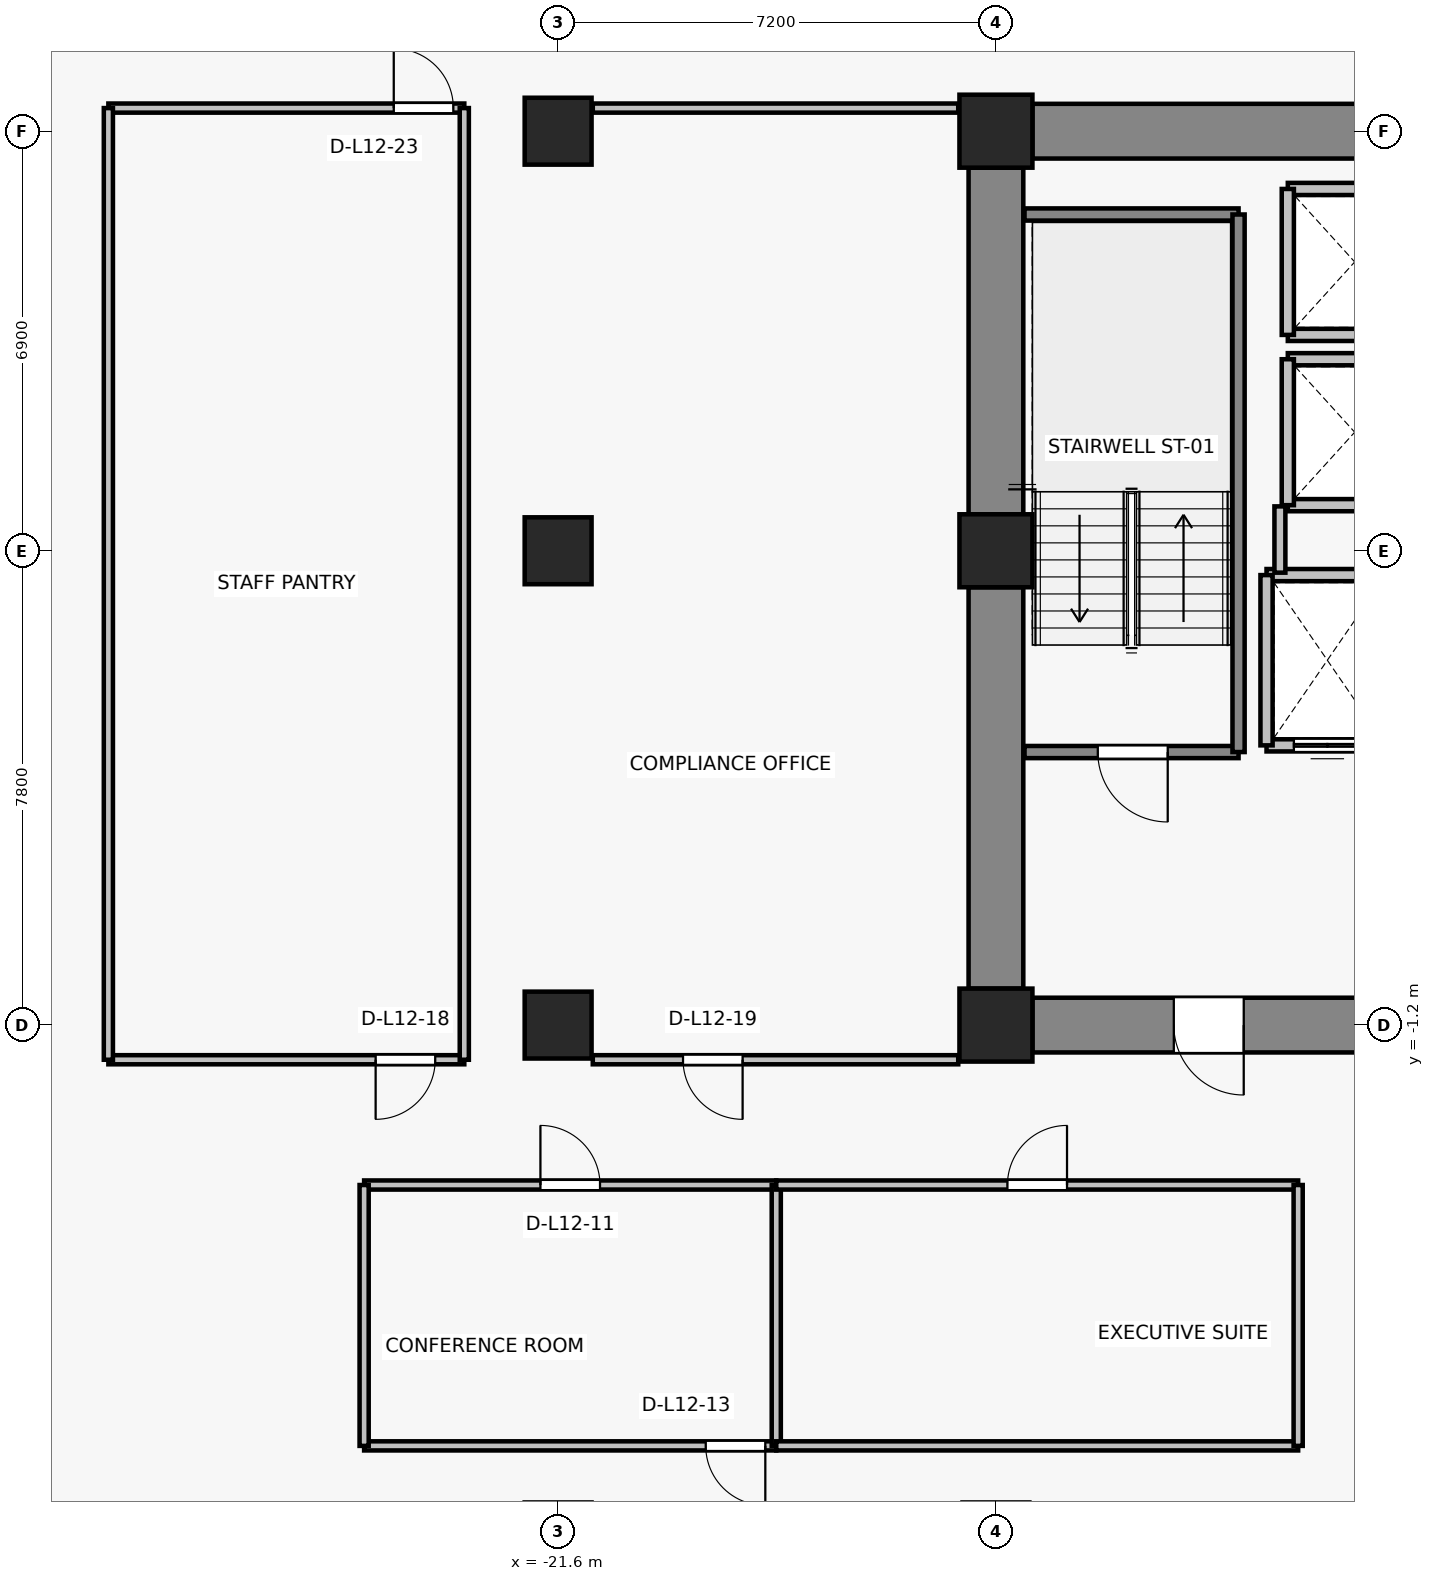
"""IFC4 building model, lengths in metres.
Left out: names, types, materials, properties, quantities, classifications, styles, units other than length and angle.
Written with IfcOpenShell. Run it as: python <this file> out.ifc"""

import sys

from ifc_helpers import new_model, si_unit, direction, frame, frame_2d, origin, origin_2d, place, context, subcontext, project, spatial, rectangle, extrude, source, transform, mapped, element, fill, save


model = new_model("IFC4")
c1 = context("Model", 3, precision=1e-05, world=origin(), true_north=direction((0.0, 1.0)))
c2 = subcontext(c1, "Body", "Model", "MODEL_VIEW")
j1 = project(units=[si_unit("LENGTHUNIT", "METRE"), si_unit("PLANEANGLEUNIT", "RADIAN")], contexts=[c1])
p1 = place(None, origin())
s1 = spatial("IfcSite", under=j1, at=p1, CompositionType="ELEMENT")
p2 = place(p1, origin())
s2 = spatial("IfcBuilding", under=s1, at=p2, CompositionType="ELEMENT")
p3 = place(p2, frame((0.0, 0.0, 47.2)))
s3 = spatial("IfcBuildingStorey", under=s2, at=p3, CompositionType="ELEMENT", Elevation=47.2)
for number, where, z_axis, x_axis in (
    (1, (-14.4, -1.2, 0.0), (0.0, 0.0, 1.0), (1.0, 0.0, 0.0)),
    (2, (-14.4, 6.6, 0.0), (0.0, 0.0, 1.0), (1.0, 0.0, 0.0)),
    (3, (-14.4, 13.5, 0.0), (0.0, 0.0, 1.0), (1.0, 0.0, 0.0)),
):
    element("IfcColumn", number, at=place(p3, frame(where, z_axis=z_axis, x_axis=x_axis)), inside=s3, PredefinedType="COLUMN", context=c2, shape_type="SweptSolid", body=[
        extrude(rectangle(XDim=1.2, YDim=1.2, at=origin_2d()), origin(), (0.0, 0.0, 1.0), 3.3),
    ])
for number, where, z_axis, x_axis in (
    (4, (-21.6, -1.2, 0.0), (0.0, 0.0, 1.0), (1.0, 0.0, 0.0)),
    (5, (-21.6, 6.6, 0.0), (0.0, 0.0, 1.0), (1.0, 0.0, 0.0)),
    (6, (-21.6, 13.5, 0.0), (0.0, 0.0, 1.0), (1.0, 0.0, 0.0)),
):
    element("IfcColumn", number, at=place(p3, frame(where, z_axis=z_axis, x_axis=x_axis)), inside=s3, PredefinedType="COLUMN", context=c2, shape_type="SweptSolid", body=[
        extrude(rectangle(XDim=1.1, YDim=1.1, at=origin_2d()), origin(), (0.0, 0.0, 1.0), 3.3),
    ])
p4 = place(p3, frame((-13.8, 13.5, 0.0), z_axis=(0.0, 0.0, 1.0), x_axis=(1.0, 0.0, 0.0)))
e7 = element("IfcWall", 7, at=p4, inside=s3, PredefinedType="SHEAR", context=c2, shape_type="SweptSolid", body=[
    extrude(rectangle(XDim=6.0, YDim=0.9, at=frame_2d((3.0, 0.0))), origin(), (0.0, 0.0, 1.0), 3.075),
])
p5 = place(p3, frame((-14.4, -0.6, 0.0), z_axis=(0.0, 0.0, 1.0), x_axis=(0.0, 1.0, 0.0)))
e8 = element("IfcWall", 8, at=p5, inside=s3, PredefinedType="SHEAR", context=c2, shape_type="SweptSolid", body=[
    extrude(rectangle(XDim=6.6, YDim=0.9, at=frame_2d((3.3, 0.0))), origin(), (0.0, 0.0, 1.0), 3.075),
])
p6 = place(p3, frame((-14.4, 7.2, 0.0), z_axis=(0.0, 0.0, 1.0), x_axis=(0.0, 1.0, 0.0)))
e9 = element("IfcWall", 9, at=p6, inside=s3, PredefinedType="SHEAR", context=c2, shape_type="SweptSolid", body=[
    extrude(rectangle(XDim=5.7, YDim=0.9, at=frame_2d((2.85, 0.0))), origin(), (0.0, 0.0, 1.0), 3.075),
])
p7 = place(p3, frame((-7.8, -1.2, 0.0), z_axis=(0.0, 0.0, 1.0), x_axis=(-1.0, 0.0, 0.0)))
e10 = element("IfcWall", 10, at=p7, inside=s3, PredefinedType="SHEAR", context=c2, shape_type="SweptSolid", body=[
    extrude(rectangle(XDim=6.0, YDim=0.9, at=frame_2d((3.0, 0.0))), origin(), (0.0, 0.0, 1.0), 3.075),
])
p8 = place(p7, frame((2.525, 0.0, 0.0)))
e11 = element("IfcOpeningElement", 11, at=p8, cuts=e10, PredefinedType="OPENING", context=c2, shape_type="SweptSolid", body=[
    extrude(rectangle(XDim=1.15, YDim=2.15, at=frame_2d((0.575, 1.075))), frame((0.0, 0.46, 0.0), z_axis=(0.0, -1.0, 0.0), x_axis=(1.0, 0.0, 0.0)), (0.0, 0.0, 1.0), 0.92),
])
p9 = place(p3, frame((-7.95, 3.4, 0.0), z_axis=(0.0, 0.0, 1.0), x_axis=(-1.0, 0.0, 0.0)))
e12 = element("IfcWall", 12, at=p9, inside=s3, PredefinedType="SOLIDWALL", context=c2, shape_type="SweptSolid", body=[
    extrude(rectangle(XDim=2.0, YDim=0.2, at=frame_2d((1.0, 0.0))), origin(), (0.0, 0.0, 1.0), 3.075),
])
p10 = place(p9, frame((0.45, 0.0, 0.0)))
e13 = element("IfcOpeningElement", 13, at=p10, cuts=e12, PredefinedType="OPENING", context=c2, shape_type="SweptSolid", body=[
    extrude(rectangle(XDim=1.1, YDim=2.2, at=frame_2d((0.55, 1.1))), frame((0.0, 0.11, 0.0), z_axis=(0.0, -1.0, 0.0), x_axis=(1.0, 0.0, 0.0)), (0.0, 0.0, 1.0), 0.22),
])
p11 = place(p3, frame((-9.95, 6.2, 0.0), z_axis=(0.0, 0.0, 1.0), x_axis=(1.0, 0.0, 0.0)))
e14 = element("IfcWall", 14, at=p11, inside=s3, PredefinedType="SOLIDWALL", context=c2, shape_type="SweptSolid", body=[
    extrude(rectangle(XDim=2.0, YDim=0.2, at=frame_2d((1.0, 0.0))), origin(), (0.0, 0.0, 1.0), 3.075),
])
p12 = place(p3, frame((-9.95, 3.4, 0.0), z_axis=(0.0, 0.0, 1.0), x_axis=(0.0, 1.0, 0.0)))
e15 = element("IfcWall", 15, at=p12, inside=s3, PredefinedType="SOLIDWALL", context=c2, shape_type="SweptSolid", body=[
    extrude(rectangle(XDim=2.8, YDim=0.2, at=frame_2d((1.4, 0.0))), origin(), (0.0, 0.0, 1.0), 3.075),
])
for number, where, z_axis, x_axis in (
    (16, (-7.4, 7.35, 0.0), (0.0, 0.0, 1.0), (-1.0, 0.0, 0.0)),
    (17, (-9.6, 9.75, 0.0), (0.0, 0.0, 1.0), (1.0, 0.0, 0.0)),
):
    element("IfcWall", number, at=place(p3, frame(where, z_axis=z_axis, x_axis=x_axis)), inside=s3, PredefinedType="SOLIDWALL", context=c2, shape_type="SweptSolid", body=[
        extrude(rectangle(XDim=2.2, YDim=0.2, at=frame_2d((1.1, 0.0))), origin(), (0.0, 0.0, 1.0), 2.465),
    ])
p13 = place(p3, frame((-9.6, 7.35, 0.0), z_axis=(0.0, 0.0, 1.0), x_axis=(0.0, 1.0, 0.0)))
e18 = element("IfcWall", 18, at=p13, inside=s3, PredefinedType="SOLIDWALL", context=c2, shape_type="SweptSolid", body=[
    extrude(rectangle(XDim=2.4, YDim=0.2, at=frame_2d((1.2, 0.0))), origin(), (0.0, 0.0, 1.0), 3.075),
])
for number, where, z_axis, x_axis in (
    (19, (-7.4, 10.15, 0.0), (0.0, 0.0, 1.0), (-1.0, 0.0, 0.0)),
    (20, (-9.6, 12.55, 0.0), (0.0, 0.0, 1.0), (1.0, 0.0, 0.0)),
):
    element("IfcWall", number, at=place(p3, frame(where, z_axis=z_axis, x_axis=x_axis)), inside=s3, PredefinedType="SOLIDWALL", context=c2, shape_type="SweptSolid", body=[
        extrude(rectangle(XDim=2.2, YDim=0.2, at=frame_2d((1.1, 0.0))), origin(), (0.0, 0.0, 1.0), 2.465),
    ])
p14 = place(p3, frame((-9.6, 10.15, 0.0), z_axis=(0.0, 0.0, 1.0), x_axis=(0.0, 1.0, 0.0)))
e21 = element("IfcWall", 21, at=p14, inside=s3, PredefinedType="SOLIDWALL", context=c2, shape_type="SweptSolid", body=[
    extrude(rectangle(XDim=2.4, YDim=0.2, at=frame_2d((1.2, 0.0))), origin(), (0.0, 0.0, 1.0), 3.075),
])
p15 = place(p3, frame((-10.41, 3.29, 0.0), z_axis=(0.0, 0.0, 1.0), x_axis=(-1.0, 0.0, 0.0)))
e22 = element("IfcWall", 22, at=p15, inside=s3, PredefinedType="SOLIDWALL", context=c2, shape_type="SweptSolid", body=[
    extrude(rectangle(XDim=3.52, YDim=0.2, at=frame_2d((1.76, 0.0))), origin(), (0.0, 0.0, 1.0), 3.075),
])
p16 = place(p15, frame((1.165, 0.0, 0.0)))
e23 = element("IfcOpeningElement", 23, at=p16, cuts=e22, PredefinedType="OPENING", context=c2, shape_type="SweptSolid", body=[
    extrude(rectangle(XDim=1.15, YDim=2.15, at=frame_2d((0.575, 1.075))), frame((0.0, 0.11, 0.0), z_axis=(0.0, -1.0, 0.0), x_axis=(1.0, 0.0, 0.0)), (0.0, 0.0, 1.0), 0.22),
])
p17 = place(p3, frame((-13.93, 12.13, 0.0), z_axis=(0.0, 0.0, 1.0), x_axis=(1.0, 0.0, 0.0)))
e24 = element("IfcWall", 24, at=p17, inside=s3, PredefinedType="SOLIDWALL", context=c2, shape_type="SweptSolid", body=[
    extrude(rectangle(XDim=3.52, YDim=0.2, at=frame_2d((1.76, 0.0))), origin(), (0.0, 0.0, 1.0), 3.075),
])
p18 = place(p3, frame((-10.41, 12.13, 0.0), z_axis=(0.0, 0.0, 1.0), x_axis=(0.0, -1.0, 0.0)))
e25 = element("IfcWall", 25, at=p18, inside=s3, PredefinedType="SOLIDWALL", context=c2, shape_type="SweptSolid", body=[
    extrude(rectangle(XDim=8.84, YDim=0.2, at=frame_2d((4.42, 0.0))), origin(), (0.0, 0.0, 1.0), 3.075),
])
p19 = place(p3, frame((-9.73, 6.24, 0.0), z_axis=(0.0, 0.0, 1.0), x_axis=(0.0, 1.0, 0.0)))
e26 = element("IfcWall", 26, at=p19, inside=s3, PredefinedType="PARTITIONING", context=c2, shape_type="SweptSolid", body=[
    extrude(rectangle(XDim=1.09, YDim=0.18, at=frame_2d((0.545, 0.0))), origin(), (0.0, 0.0, 1.0), 3.075),
])
p20 = place(p3, frame((-18.012, -8.12, 0.0), z_axis=(0.0, 0.0, 1.0), x_axis=(-1.0, 0.0, 0.0)))
e27 = element("IfcWall", 27, at=p20, inside=s3, PredefinedType="PARTITIONING", context=c2, shape_type="SweptSolid", body=[
    extrude(rectangle(XDim=6.778, YDim=0.15, at=frame_2d((3.389, 0.0))), origin(), (0.0, 0.0, 1.0), 2.465),
])
p21 = place(p20, frame((0.18, 0.0, 0.0)))
e28 = element("IfcOpeningElement", 28, at=p21, cuts=e27, PredefinedType="OPENING", context=c2, shape_type="SweptSolid", body=[
    extrude(rectangle(XDim=0.98, YDim=2.15, at=frame_2d((0.49, 1.075))), frame((0.0, 0.085, 0.0), z_axis=(0.0, -1.0, 0.0), x_axis=(1.0, 0.0, 0.0)), (0.0, 0.0, 1.0), 0.17),
])
p22 = place(p3, frame((-24.79, -3.83, 0.0), z_axis=(0.0, 0.0, 1.0), x_axis=(1.0, 0.0, 0.0)))
e29 = element("IfcWall", 29, at=p22, inside=s3, PredefinedType="PARTITIONING", context=c2, shape_type="SweptSolid", body=[
    extrude(rectangle(XDim=6.778, YDim=0.15, at=frame_2d((3.389, 0.0))), origin(), (0.0, 0.0, 1.0), 2.465),
])
p23 = place(p22, frame((2.899, 0.0, 0.0)))
e30 = element("IfcOpeningElement", 30, at=p23, cuts=e29, PredefinedType="OPENING", context=c2, shape_type="SweptSolid", body=[
    extrude(rectangle(XDim=0.98, YDim=2.15, at=frame_2d((0.49, 1.075))), frame((0.0, 0.085, 0.0), z_axis=(0.0, -1.0, 0.0), x_axis=(1.0, 0.0, 0.0)), (0.0, 0.0, 1.0), 0.17),
])
for number, where, z_axis, x_axis in (
    (31, (-24.79, -8.12, 0.0), (0.0, 0.0, 1.0), (0.0, 1.0, 0.0)),
    (32, (-18.012, -3.83, 0.0), (0.0, 0.0, 1.0), (0.0, -1.0, 0.0)),
):
    element("IfcWall", number, at=place(p3, frame(where, z_axis=z_axis, x_axis=x_axis)), inside=s3, PredefinedType="PARTITIONING", context=c2, shape_type="SweptSolid", body=[
        extrude(rectangle(XDim=4.29, YDim=0.15, at=frame_2d((2.145, 0.0))), origin(), (0.0, 0.0, 1.0), 2.565),
    ])
p24 = place(p3, frame((-9.43, -8.12, 0.0), z_axis=(0.0, 0.0, 1.0), x_axis=(-1.0, 0.0, 0.0)))
e33 = element("IfcWall", 33, at=p24, inside=s3, PredefinedType="PARTITIONING", context=c2, shape_type="SweptSolid", body=[
    extrude(rectangle(XDim=8.583, YDim=0.15, at=frame_2d((4.291, 0.0))), origin(), (0.0, 0.0, 1.0), 2.465),
])
p25 = place(p3, frame((-18.012, -3.83, 0.0), z_axis=(0.0, 0.0, 1.0), x_axis=(1.0, 0.0, 0.0)))
e34 = element("IfcWall", 34, at=p25, inside=s3, PredefinedType="PARTITIONING", context=c2, shape_type="SweptSolid", body=[
    extrude(rectangle(XDim=8.583, YDim=0.15, at=frame_2d((4.291, 0.0))), origin(), (0.0, 0.0, 1.0), 2.465),
])
p26 = place(p25, frame((3.802, 0.0, 0.0)))
e35 = element("IfcOpeningElement", 35, at=p26, cuts=e34, PredefinedType="OPENING", context=c2, shape_type="SweptSolid", body=[
    extrude(rectangle(XDim=0.98, YDim=2.15, at=frame_2d((0.49, 1.075))), frame((0.0, 0.085, 0.0), z_axis=(0.0, -1.0, 0.0), x_axis=(1.0, 0.0, 0.0)), (0.0, 0.0, 1.0), 0.17),
])
p27 = place(p3, frame((-9.43, -3.83, 0.0), z_axis=(0.0, 0.0, 1.0), x_axis=(0.0, -1.0, 0.0)))
e36 = element("IfcWall", 36, at=p27, inside=s3, PredefinedType="PARTITIONING", context=c2, shape_type="SweptSolid", body=[
    extrude(rectangle(XDim=4.29, YDim=0.15, at=frame_2d((2.145, 0.0))), origin(), (0.0, 0.0, 1.0), 2.565),
])
p28 = place(p3, frame((-23.143, -1.77, 0.0), z_axis=(0.0, 0.0, 1.0), x_axis=(-1.0, 0.0, 0.0)))
e37 = element("IfcWall", 37, at=p28, inside=s3, PredefinedType="PARTITIONING", context=c2, shape_type="SweptSolid", body=[
    extrude(rectangle(XDim=5.853, YDim=0.15, at=frame_2d((2.927, 0.0))), origin(), (0.0, 0.0, 1.0), 3.075),
])
p29 = place(p28, frame((0.478, 0.0, 0.0)))
e38 = element("IfcOpeningElement", 38, at=p29, cuts=e37, PredefinedType="OPENING", context=c2, shape_type="SweptSolid", body=[
    extrude(rectangle(XDim=0.98, YDim=2.15, at=frame_2d((0.49, 1.075))), frame((0.0, 0.085, 0.0), z_axis=(0.0, -1.0, 0.0), x_axis=(1.0, 0.0, 0.0)), (0.0, 0.0, 1.0), 0.17),
])
p30 = place(p3, frame((-28.996, 13.88, 0.0), z_axis=(0.0, 0.0, 1.0), x_axis=(1.0, 0.0, 0.0)))
e39 = element("IfcWall", 39, at=p30, inside=s3, PredefinedType="PARTITIONING", context=c2, shape_type="SweptSolid", body=[
    extrude(rectangle(XDim=5.853, YDim=0.15, at=frame_2d((2.927, 0.0))), origin(), (0.0, 0.0, 1.0), 3.075),
])
p31 = place(p30, frame((4.693, 0.0, 0.0)))
e40 = element("IfcOpeningElement", 40, at=p31, cuts=e39, PredefinedType="OPENING", context=c2, shape_type="SweptSolid", body=[
    extrude(rectangle(XDim=0.98, YDim=2.15, at=frame_2d((0.49, 1.075))), frame((0.0, 0.085, 0.0), z_axis=(0.0, -1.0, 0.0), x_axis=(1.0, 0.0, 0.0)), (0.0, 0.0, 1.0), 0.17),
])
for number, where, z_axis, x_axis in (
    (41, (-28.996, -1.77, 0.0), (0.0, 0.0, 1.0), (0.0, 1.0, 0.0)),
    (42, (-23.143, 13.88, 0.0), (0.0, 0.0, 1.0), (0.0, -1.0, 0.0)),
):
    element("IfcWall", number, at=place(p3, frame(where, z_axis=z_axis, x_axis=x_axis)), inside=s3, PredefinedType="PARTITIONING", context=c2, shape_type="SweptSolid", body=[
        extrude(rectangle(XDim=15.65, YDim=0.15, at=frame_2d((7.825, 0.0))), origin(), (0.0, 0.0, 1.0), 2.465),
    ])
p32 = place(p3, frame((-15.02, -1.77, 0.0), z_axis=(0.0, 0.0, 1.0), x_axis=(-1.0, 0.0, 0.0)))
e43 = element("IfcWall", 43, at=p32, inside=s3, PredefinedType="PARTITIONING", context=c2, shape_type="SweptSolid", body=[
    extrude(rectangle(XDim=6.01, YDim=0.15, at=frame_2d((3.005, 0.0))), origin(), (0.0, 0.0, 1.0), 3.075),
])
p33 = place(p32, frame((3.546, 0.0, 0.0)))
e44 = element("IfcOpeningElement", 44, at=p33, cuts=e43, PredefinedType="OPENING", context=c2, shape_type="SweptSolid", body=[
    extrude(rectangle(XDim=0.98, YDim=2.15, at=frame_2d((0.49, 1.075))), frame((0.0, 0.085, 0.0), z_axis=(0.0, -1.0, 0.0), x_axis=(1.0, 0.0, 0.0)), (0.0, 0.0, 1.0), 0.17),
])
p34 = place(p3, frame((-21.03, 13.88, 0.0), z_axis=(0.0, 0.0, 1.0), x_axis=(1.0, 0.0, 0.0)))
e45 = element("IfcWall", 45, at=p34, inside=s3, PredefinedType="PARTITIONING", context=c2, shape_type="SweptSolid", body=[
    extrude(rectangle(XDim=6.01, YDim=0.15, at=frame_2d((3.005, 0.0))), origin(), (0.0, 0.0, 1.0), 3.075),
])
m1 = source(origin(), c2, "Body", "SweptSolid", [
    extrude(rectangle(XDim=1.1, YDim=2.2, at=frame_2d((0.55, 1.1))), frame((0.0, 0.025, 0.0), z_axis=(0.0, -1.0, 0.0), x_axis=(1.0, 0.0, 0.0)), (0.0, 0.0, 1.0), 0.05),
])
p35 = place(p10, origin())
e46 = element("IfcDoor", 46, at=p35, inside=s3, OperationType="DOUBLE_DOOR_SLIDING", PredefinedType="DOOR", context=c2, shape_type="MappedRepresentation", body=[
    mapped(m1, transform((0.0, 0.0, 0.0), x_axis=(1.0, 0.0, 0.0), y_axis=(0.0, 1.0, 0.0), z_axis=(0.0, 0.0, 1.0), scale=1.0)),
])
fill(e13, e46)
m2 = source(origin(), c2, "Body", "SweptSolid", [
    extrude(rectangle(XDim=1.15, YDim=2.15, at=frame_2d((0.575, 1.075))), frame((0.0, 0.025, 0.0), z_axis=(0.0, -1.0, 0.0), x_axis=(1.0, 0.0, 0.0)), (0.0, 0.0, 1.0), 0.05),
])
p36 = place(p16, origin())
e47 = element("IfcDoor", 47, at=p36, inside=s3, OperationType="SINGLE_SWING_LEFT", PredefinedType="DOOR", context=c2, shape_type="MappedRepresentation", body=[
    mapped(m2, transform((0.0, 0.0, 0.0), x_axis=(1.0, 0.0, 0.0), y_axis=(0.0, 1.0, 0.0), z_axis=(0.0, 0.0, 1.0), scale=1.0)),
])
fill(e23, e47)
p37 = place(p8, origin())
e48 = element("IfcDoor", 48, at=p37, inside=s3, OperationType="SINGLE_SWING_LEFT", PredefinedType="DOOR", context=c2, shape_type="MappedRepresentation", body=[
    mapped(m2, transform((0.0, 0.0, 0.0), x_axis=(1.0, 0.0, 0.0), y_axis=(0.0, 1.0, 0.0), z_axis=(0.0, 0.0, 1.0), scale=1.0)),
])
fill(e11, e48)
m3 = source(origin(), c2, "Body", "SweptSolid", [
    extrude(rectangle(XDim=0.98, YDim=2.15, at=frame_2d((0.49, 1.075))), frame((0.0, 0.025, 0.0), z_axis=(0.0, -1.0, 0.0), x_axis=(1.0, 0.0, 0.0)), (0.0, 0.0, 1.0), 0.05),
])
p38 = place(p23, origin())
e49 = element("IfcDoor", 49, at=p38, inside=s3, OperationType="SINGLE_SWING_LEFT", PredefinedType="DOOR", context=c2, shape_type="MappedRepresentation", body=[
    mapped(m3, transform((0.0, 0.0, 0.0), x_axis=(1.0, 0.0, 0.0), y_axis=(0.0, 1.0, 0.0), z_axis=(0.0, 0.0, 1.0), scale=1.0)),
])
fill(e30, e49)
p39 = place(p26, origin())
e50 = element("IfcDoor", 50, at=p39, inside=s3, OperationType="SINGLE_SWING_RIGHT", PredefinedType="DOOR", context=c2, shape_type="MappedRepresentation", body=[
    mapped(m3, transform((0.0, 0.0, 0.0), x_axis=(1.0, 0.0, 0.0), y_axis=(0.0, 1.0, 0.0), z_axis=(0.0, 0.0, 1.0), scale=1.0)),
])
fill(e35, e50)
p40 = place(p21, origin())
e51 = element("IfcDoor", 51, at=p40, inside=s3, OperationType="SINGLE_SWING_LEFT", PredefinedType="DOOR", context=c2, shape_type="MappedRepresentation", body=[
    mapped(m3, transform((0.0, 0.0, 0.0), x_axis=(1.0, 0.0, 0.0), y_axis=(0.0, 1.0, 0.0), z_axis=(0.0, 0.0, 1.0), scale=1.0)),
])
fill(e28, e51)
p41 = place(p29, origin())
e52 = element("IfcDoor", 52, at=p41, inside=s3, OperationType="SINGLE_SWING_RIGHT", PredefinedType="DOOR", context=c2, shape_type="MappedRepresentation", body=[
    mapped(m3, transform((0.0, 0.0, 0.0), x_axis=(1.0, 0.0, 0.0), y_axis=(0.0, 1.0, 0.0), z_axis=(0.0, 0.0, 1.0), scale=1.0)),
])
fill(e38, e52)
p42 = place(p33, origin())
e53 = element("IfcDoor", 53, at=p42, inside=s3, OperationType="SINGLE_SWING_LEFT", PredefinedType="DOOR", context=c2, shape_type="MappedRepresentation", body=[
    mapped(m3, transform((0.0, 0.0, 0.0), x_axis=(1.0, 0.0, 0.0), y_axis=(0.0, 1.0, 0.0), z_axis=(0.0, 0.0, 1.0), scale=1.0)),
])
fill(e44, e53)
p43 = place(p31, origin())
e54 = element("IfcDoor", 54, at=p43, inside=s3, OperationType="SINGLE_SWING_LEFT", PredefinedType="DOOR", context=c2, shape_type="MappedRepresentation", body=[
    mapped(m3, transform((0.0, 0.0, 0.0), x_axis=(1.0, 0.0, 0.0), y_axis=(0.0, 1.0, 0.0), z_axis=(0.0, 0.0, 1.0), scale=1.0)),
])
fill(e40, e54)
save(model, sys.argv[1])
